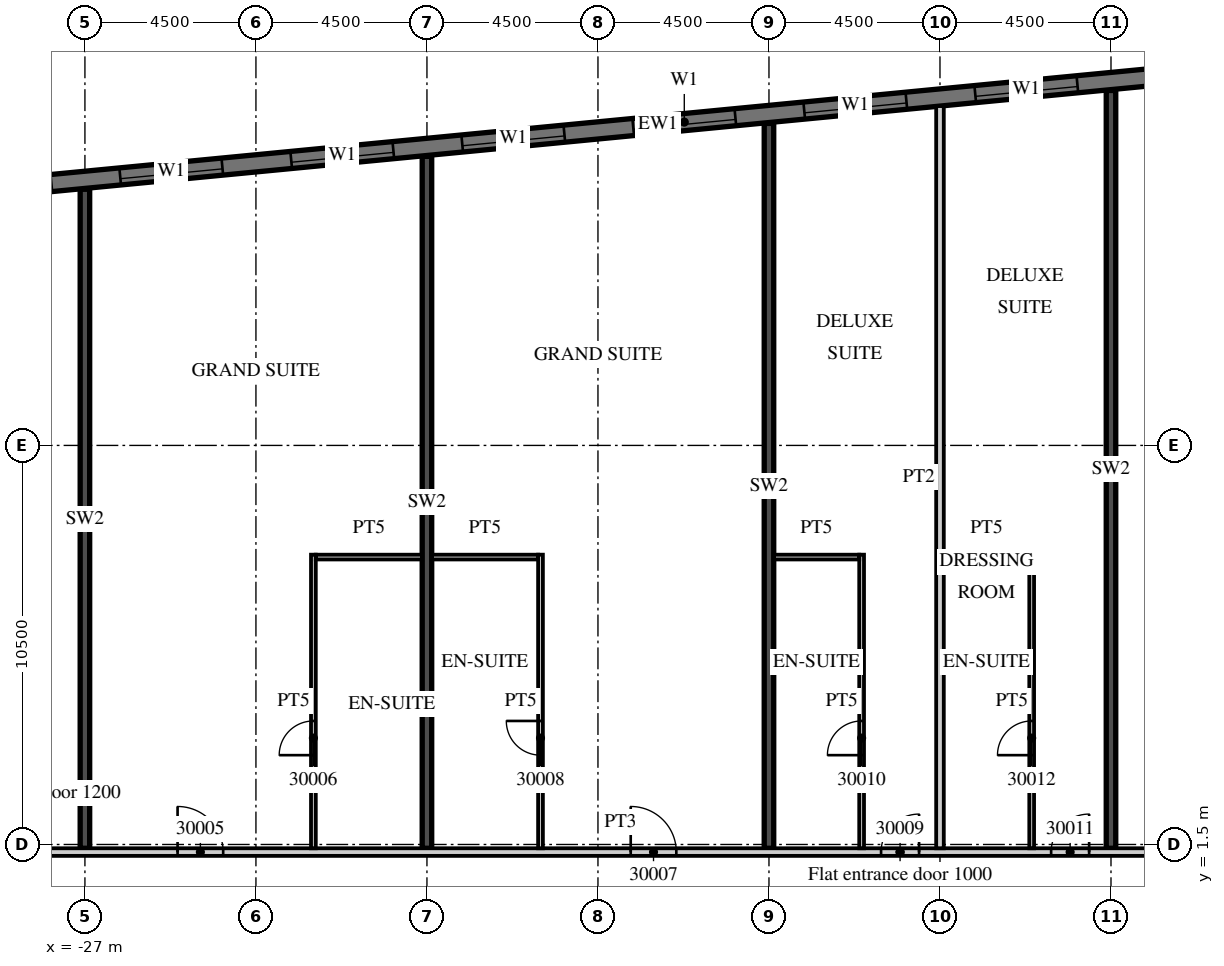
"""IFC4 building model, lengths in metres.
Left out: names, types, materials, properties, quantities, classifications, styles, units other than length and angle.
Written with IfcOpenShell. Run it as: python <this file> out.ifc"""

import sys

from ifc_helpers import new_model, si_unit, direction, frame, frame_2d, origin, place, context, subcontext, project, spatial, rectangle, extrude, element, fill, save


model = new_model("IFC4")
c1 = context("Model", 3, precision=1e-05, world=origin(), true_north=direction((0.0, 1.0)))
c2 = subcontext(c1, "Body", "Model", "MODEL_VIEW")
j1 = project(units=[si_unit("LENGTHUNIT", "METRE"), si_unit("PLANEANGLEUNIT", "RADIAN")], contexts=[c1])
p1 = place(None, origin())
s1 = spatial("IfcSite", under=j1, at=p1, CompositionType="ELEMENT")
p2 = place(p1, origin())
s2 = spatial("IfcBuilding", under=s1, at=p2, CompositionType="ELEMENT")
p3 = place(p2, frame((0.0, 0.0, 133.9)))
s3 = spatial("IfcBuildingStorey", under=s2, at=p3, CompositionType="ELEMENT", Elevation=133.9)
p4 = place(p3, frame((-27.0, 1.4, 0.0), z_axis=(0.0, 0.0, 1.0), x_axis=(0.0, 1.0, 0.0)))
e1 = element("IfcWall", 1, at=p4, inside=s3, PredefinedType="SHEAR", context=c2, shape_type="SweptSolid", body=[
    extrude(rectangle(XDim=17.34, YDim=0.25, at=frame_2d((8.67, 0.0))), origin(), (0.0, 0.0, 1.0), 3.3),
])
p5 = place(p3, frame((-18.0, 1.4, 0.0), z_axis=(0.0, 0.0, 1.0), x_axis=(0.0, 1.0, 0.0)))
e2 = element("IfcWall", 2, at=p5, inside=s3, PredefinedType="SHEAR", context=c2, shape_type="SweptSolid", body=[
    extrude(rectangle(XDim=18.207, YDim=0.25, at=frame_2d((9.104, 0.0))), origin(), (0.0, 0.0, 1.0), 3.3),
])
p6 = place(p3, frame((-9.0, 1.4, 0.0), z_axis=(0.0, 0.0, 1.0), x_axis=(0.0, 1.0, 0.0)))
e3 = element("IfcWall", 3, at=p6, inside=s3, PredefinedType="SHEAR", context=c2, shape_type="SweptSolid", body=[
    extrude(rectangle(XDim=19.073, YDim=0.25, at=frame_2d((9.537, 0.0))), origin(), (0.0, 0.0, 1.0), 3.3),
])
p7 = place(p3, frame((0.0, 1.4, 0.0), z_axis=(0.0, 0.0, 1.0), x_axis=(0.0, 1.0, 0.0)))
e4 = element("IfcWall", 4, at=p7, inside=s3, PredefinedType="SHEAR", context=c2, shape_type="SweptSolid", body=[
    extrude(rectangle(XDim=19.94, YDim=0.25, at=frame_2d((9.97, 0.0))), origin(), (0.0, 0.0, 1.0), 3.3),
])
p8 = place(p3, frame((13.521, 22.89, 0.0), z_axis=(0.0, 0.0, 1.0), x_axis=(-0.995396445054, -0.095843190545, 0.0)))
e5 = element("IfcWall", 5, at=p8, inside=s3, PredefinedType="SOLIDWALL", context=c2, shape_type="SweptSolid", body=[
    extrude(rectangle(XDim=51.114, YDim=0.45, at=frame_2d((25.557, 0.0))), origin(), (0.0, 0.0, 1.0), 3.02),
])
p9 = place(p8, frame((0.91, 0.0, 0.45)))
e6 = element("IfcOpeningElement", 6, at=p9, cuts=e5, PredefinedType="OPENING", context=c2, shape_type="SweptSolid", body=[
    extrude(rectangle(XDim=2.7, YDim=2.25, at=frame_2d((1.35, 1.125))), frame((0.0, 0.235, 0.0), z_axis=(0.0, -1.0, 0.0), x_axis=(1.0, 0.0, 0.0)), (0.0, 0.0, 1.0), 0.47),
])
p10 = place(p8, frame((5.431, 0.0, 0.45)))
e7 = element("IfcOpeningElement", 7, at=p10, cuts=e5, PredefinedType="OPENING", context=c2, shape_type="SweptSolid", body=[
    extrude(rectangle(XDim=2.7, YDim=2.25, at=frame_2d((1.35, 1.125))), frame((0.0, 0.235, 0.0), z_axis=(0.0, -1.0, 0.0), x_axis=(1.0, 0.0, 0.0)), (0.0, 0.0, 1.0), 0.47),
])
p11 = place(p8, frame((9.952, 0.0, 0.45)))
e8 = element("IfcOpeningElement", 8, at=p11, cuts=e5, PredefinedType="OPENING", context=c2, shape_type="SweptSolid", body=[
    extrude(rectangle(XDim=2.7, YDim=2.25, at=frame_2d((1.35, 1.125))), frame((0.0, 0.235, 0.0), z_axis=(0.0, -1.0, 0.0), x_axis=(1.0, 0.0, 0.0)), (0.0, 0.0, 1.0), 0.47),
])
p12 = place(p8, frame((14.473, 0.0, 0.45)))
e9 = element("IfcOpeningElement", 9, at=p12, cuts=e5, PredefinedType="OPENING", context=c2, shape_type="SweptSolid", body=[
    extrude(rectangle(XDim=2.7, YDim=2.25, at=frame_2d((1.35, 1.125))), frame((0.0, 0.235, 0.0), z_axis=(0.0, -1.0, 0.0), x_axis=(1.0, 0.0, 0.0)), (0.0, 0.0, 1.0), 0.47),
])
p13 = place(p8, frame((18.994, 0.0, 0.45)))
e10 = element("IfcOpeningElement", 10, at=p13, cuts=e5, PredefinedType="OPENING", context=c2, shape_type="SweptSolid", body=[
    extrude(rectangle(XDim=2.7, YDim=2.25, at=frame_2d((1.35, 1.125))), frame((0.0, 0.235, 0.0), z_axis=(0.0, -1.0, 0.0), x_axis=(1.0, 0.0, 0.0)), (0.0, 0.0, 1.0), 0.47),
])
p14 = place(p8, frame((23.514, 0.0, 0.45)))
e11 = element("IfcOpeningElement", 11, at=p14, cuts=e5, PredefinedType="OPENING", context=c2, shape_type="SweptSolid", body=[
    extrude(rectangle(XDim=2.7, YDim=2.25, at=frame_2d((1.35, 1.125))), frame((0.0, 0.235, 0.0), z_axis=(0.0, -1.0, 0.0), x_axis=(1.0, 0.0, 0.0)), (0.0, 0.0, 1.0), 0.47),
])
p15 = place(p8, frame((28.035, 0.0, 0.45)))
e12 = element("IfcOpeningElement", 12, at=p15, cuts=e5, PredefinedType="OPENING", context=c2, shape_type="SweptSolid", body=[
    extrude(rectangle(XDim=2.7, YDim=2.25, at=frame_2d((1.35, 1.125))), frame((0.0, 0.235, 0.0), z_axis=(0.0, -1.0, 0.0), x_axis=(1.0, 0.0, 0.0)), (0.0, 0.0, 1.0), 0.47),
])
p16 = place(p8, frame((32.556, 0.0, 0.45)))
e13 = element("IfcOpeningElement", 13, at=p16, cuts=e5, PredefinedType="OPENING", context=c2, shape_type="SweptSolid", body=[
    extrude(rectangle(XDim=2.7, YDim=2.25, at=frame_2d((1.35, 1.125))), frame((0.0, 0.235, 0.0), z_axis=(0.0, -1.0, 0.0), x_axis=(1.0, 0.0, 0.0)), (0.0, 0.0, 1.0), 0.47),
])
p17 = place(p8, frame((37.077, 0.0, 0.45)))
e14 = element("IfcOpeningElement", 14, at=p17, cuts=e5, PredefinedType="OPENING", context=c2, shape_type="SweptSolid", body=[
    extrude(rectangle(XDim=2.7, YDim=2.25, at=frame_2d((1.35, 1.125))), frame((0.0, 0.235, 0.0), z_axis=(0.0, -1.0, 0.0), x_axis=(1.0, 0.0, 0.0)), (0.0, 0.0, 1.0), 0.47),
])
p18 = place(p8, frame((41.598, 0.0, 0.45)))
e15 = element("IfcOpeningElement", 15, at=p18, cuts=e5, PredefinedType="OPENING", context=c2, shape_type="SweptSolid", body=[
    extrude(rectangle(XDim=2.7, YDim=2.25, at=frame_2d((1.35, 1.125))), frame((0.0, 0.235, 0.0), z_axis=(0.0, -1.0, 0.0), x_axis=(1.0, 0.0, 0.0)), (0.0, 0.0, 1.0), 0.47),
])
p19 = place(p8, frame((46.118, 0.0, 0.45)))
e16 = element("IfcOpeningElement", 16, at=p19, cuts=e5, PredefinedType="OPENING", context=c2, shape_type="SweptSolid", body=[
    extrude(rectangle(XDim=2.7, YDim=2.25, at=frame_2d((1.35, 1.125))), frame((0.0, 0.235, 0.0), z_axis=(0.0, -1.0, 0.0), x_axis=(1.0, 0.0, 0.0)), (0.0, 0.0, 1.0), 0.47),
])
p20 = place(p3, frame((-39.316, 1.3, 0.0), z_axis=(0.0, 0.0, 1.0), x_axis=(1.0, 0.0, 0.0)))
e17 = element("IfcWall", 17, at=p20, inside=s3, PredefinedType="PARTITIONING", context=c2, shape_type="SweptSolid", body=[
    extrude(rectangle(XDim=52.816, YDim=0.2, at=frame_2d((26.408, 0.0))), origin(), (0.0, 0.0, 1.0), 3.02),
])
p21 = place(p20, frame((0.15, 0.0, 0.0)))
e18 = element("IfcOpeningElement", 18, at=p21, cuts=e17, PredefinedType="OPENING", context=c2, shape_type="SweptSolid", body=[
    extrude(rectangle(XDim=0.9, YDim=2.1, at=frame_2d((0.45, 1.05))), frame((0.0, 0.11, 0.0), z_axis=(0.0, -1.0, 0.0), x_axis=(1.0, 0.0, 0.0)), (0.0, 0.0, 1.0), 0.22),
])
p22 = place(p20, frame((8.679, 0.0, 0.0)))
e19 = element("IfcOpeningElement", 19, at=p22, cuts=e17, PredefinedType="OPENING", context=c2, shape_type="SweptSolid", body=[
    extrude(rectangle(XDim=1.2, YDim=2.1, at=frame_2d((0.6, 1.05))), frame((0.0, 0.11, 0.0), z_axis=(0.0, -1.0, 0.0), x_axis=(1.0, 0.0, 0.0)), (0.0, 0.0, 1.0), 0.22),
])
p23 = place(p20, frame((14.754, 0.0, 0.0)))
e20 = element("IfcOpeningElement", 20, at=p23, cuts=e17, PredefinedType="OPENING", context=c2, shape_type="SweptSolid", body=[
    extrude(rectangle(XDim=1.2, YDim=2.1, at=frame_2d((0.6, 1.05))), frame((0.0, 0.11, 0.0), z_axis=(0.0, -1.0, 0.0), x_axis=(1.0, 0.0, 0.0)), (0.0, 0.0, 1.0), 0.22),
])
p24 = place(p20, frame((26.678, 0.0, 0.0)))
e21 = element("IfcOpeningElement", 21, at=p24, cuts=e17, PredefinedType="OPENING", context=c2, shape_type="SweptSolid", body=[
    extrude(rectangle(XDim=1.2, YDim=2.1, at=frame_2d((0.6, 1.05))), frame((0.0, 0.11, 0.0), z_axis=(0.0, -1.0, 0.0), x_axis=(1.0, 0.0, 0.0)), (0.0, 0.0, 1.0), 0.22),
])
p25 = place(p20, frame((33.266, 0.0, 0.0)))
e22 = element("IfcOpeningElement", 22, at=p25, cuts=e17, PredefinedType="OPENING", context=c2, shape_type="SweptSolid", body=[
    extrude(rectangle(XDim=1.0, YDim=2.1, at=frame_2d((0.5, 1.05))), frame((0.0, 0.11, 0.0), z_axis=(0.0, -1.0, 0.0), x_axis=(1.0, 0.0, 0.0)), (0.0, 0.0, 1.0), 0.22),
])
p26 = place(p20, frame((37.741, 0.0, 0.0)))
e23 = element("IfcOpeningElement", 23, at=p26, cuts=e17, PredefinedType="OPENING", context=c2, shape_type="SweptSolid", body=[
    extrude(rectangle(XDim=1.0, YDim=2.1, at=frame_2d((0.5, 1.05))), frame((0.0, 0.11, 0.0), z_axis=(0.0, -1.0, 0.0), x_axis=(1.0, 0.0, 0.0)), (0.0, 0.0, 1.0), 0.22),
])
p27 = place(p20, frame((41.754, 0.0, 0.0)))
e24 = element("IfcOpeningElement", 24, at=p27, cuts=e17, PredefinedType="OPENING", context=c2, shape_type="SweptSolid", body=[
    extrude(rectangle(XDim=1.2, YDim=2.1, at=frame_2d((0.6, 1.05))), frame((0.0, 0.11, 0.0), z_axis=(0.0, -1.0, 0.0), x_axis=(1.0, 0.0, 0.0)), (0.0, 0.0, 1.0), 0.22),
])
p28 = place(p20, frame((51.241, 0.0, 0.0)))
e25 = element("IfcOpeningElement", 25, at=p28, cuts=e17, PredefinedType="OPENING", context=c2, shape_type="SweptSolid", body=[
    extrude(rectangle(XDim=1.0, YDim=2.1, at=frame_2d((0.5, 1.05))), frame((0.0, 0.11, 0.0), z_axis=(0.0, -1.0, 0.0), x_axis=(1.0, 0.0, 0.0)), (0.0, 0.0, 1.0), 0.22),
])
p29 = place(p3, frame((-20.988, 1.4, 0.0), z_axis=(0.0, 0.0, 1.0), x_axis=(0.0, 1.0, 0.0)))
e26 = element("IfcWall", 26, at=p29, inside=s3, PredefinedType="PARTITIONING", context=c2, shape_type="SweptSolid", body=[
    extrude(rectangle(XDim=7.725, YDim=0.125, at=frame_2d((3.863, 0.0))), origin(), (0.0, 0.0, 1.0), 3.02),
])
p30 = place(p29, frame((2.45, 0.0, 0.0)))
e27 = element("IfcOpeningElement", 27, at=p30, cuts=e26, PredefinedType="OPENING", context=c2, shape_type="SweptSolid", body=[
    extrude(rectangle(XDim=0.9, YDim=2.1, at=frame_2d((0.45, 1.05))), frame((0.0, 0.073, 0.0), z_axis=(0.0, -1.0, 0.0), x_axis=(1.0, 0.0, 0.0)), (0.0, 0.0, 1.0), 0.145),
])
p31 = place(p3, frame((-20.925, 9.062, 0.0), z_axis=(0.0, 0.0, 1.0), x_axis=(1.0, 0.0, 0.0)))
e28 = element("IfcWall", 28, at=p31, inside=s3, PredefinedType="PARTITIONING", context=c2, shape_type="SweptSolid", body=[
    extrude(rectangle(XDim=2.8, YDim=0.125, at=frame_2d((1.4, 0.0))), origin(), (0.0, 0.0, 1.0), 3.02),
])
p32 = place(p3, frame((-15.012, 1.4, 0.0), z_axis=(0.0, 0.0, 1.0), x_axis=(0.0, 1.0, 0.0)))
e29 = element("IfcWall", 29, at=p32, inside=s3, PredefinedType="PARTITIONING", context=c2, shape_type="SweptSolid", body=[
    extrude(rectangle(XDim=7.725, YDim=0.125, at=frame_2d((3.863, 0.0))), origin(), (0.0, 0.0, 1.0), 3.02),
])
p33 = place(p32, frame((2.45, 0.0, 0.0)))
e30 = element("IfcOpeningElement", 30, at=p33, cuts=e29, PredefinedType="OPENING", context=c2, shape_type="SweptSolid", body=[
    extrude(rectangle(XDim=0.9, YDim=2.1, at=frame_2d((0.45, 1.05))), frame((0.0, 0.073, 0.0), z_axis=(0.0, -1.0, 0.0), x_axis=(1.0, 0.0, 0.0)), (0.0, 0.0, 1.0), 0.145),
])
p34 = place(p3, frame((-17.875, 9.062, 0.0), z_axis=(0.0, 0.0, 1.0), x_axis=(1.0, 0.0, 0.0)))
e31 = element("IfcWall", 31, at=p34, inside=s3, PredefinedType="PARTITIONING", context=c2, shape_type="SweptSolid", body=[
    extrude(rectangle(XDim=2.8, YDim=0.125, at=frame_2d((1.4, 0.0))), origin(), (0.0, 0.0, 1.0), 3.02),
])
p35 = place(p3, frame((-4.5, 1.4, 0.0), z_axis=(0.0, 0.0, 1.0), x_axis=(0.0, 1.0, 0.0)))
e32 = element("IfcWall", 32, at=p35, inside=s3, PredefinedType="PARTITIONING", context=c2, shape_type="SweptSolid", body=[
    extrude(rectangle(XDim=19.529, YDim=0.2, at=frame_2d((9.765, 0.0))), origin(), (0.0, 0.0, 1.0), 3.02),
])
p36 = place(p3, frame((-6.562, 1.4, 0.0), z_axis=(0.0, 0.0, 1.0), x_axis=(0.0, 1.0, 0.0)))
e33 = element("IfcWall", 33, at=p36, inside=s3, PredefinedType="PARTITIONING", context=c2, shape_type="SweptSolid", body=[
    extrude(rectangle(XDim=7.725, YDim=0.125, at=frame_2d((3.863, 0.0))), origin(), (0.0, 0.0, 1.0), 3.02),
])
p37 = place(p36, frame((2.45, 0.0, 0.0)))
e34 = element("IfcOpeningElement", 34, at=p37, cuts=e33, PredefinedType="OPENING", context=c2, shape_type="SweptSolid", body=[
    extrude(rectangle(XDim=0.9, YDim=2.1, at=frame_2d((0.45, 1.05))), frame((0.0, 0.073, 0.0), z_axis=(0.0, -1.0, 0.0), x_axis=(1.0, 0.0, 0.0)), (0.0, 0.0, 1.0), 0.145),
])
p38 = place(p3, frame((-8.875, 9.062, 0.0), z_axis=(0.0, 0.0, 1.0), x_axis=(1.0, 0.0, 0.0)))
e35 = element("IfcWall", 35, at=p38, inside=s3, PredefinedType="PARTITIONING", context=c2, shape_type="SweptSolid", body=[
    extrude(rectangle(XDim=2.25, YDim=0.125, at=frame_2d((1.125, 0.0))), origin(), (0.0, 0.0, 1.0), 3.02),
])
p39 = place(p3, frame((-2.087, 1.4, 0.0), z_axis=(0.0, 0.0, 1.0), x_axis=(0.0, 1.0, 0.0)))
e36 = element("IfcWall", 36, at=p39, inside=s3, PredefinedType="PARTITIONING", context=c2, shape_type="SweptSolid", body=[
    extrude(rectangle(XDim=7.725, YDim=0.125, at=frame_2d((3.863, 0.0))), origin(), (0.0, 0.0, 1.0), 3.02),
])
p40 = place(p39, frame((2.45, 0.0, 0.0)))
e37 = element("IfcOpeningElement", 37, at=p40, cuts=e36, PredefinedType="OPENING", context=c2, shape_type="SweptSolid", body=[
    extrude(rectangle(XDim=0.9, YDim=2.1, at=frame_2d((0.45, 1.05))), frame((0.0, 0.073, 0.0), z_axis=(0.0, -1.0, 0.0), x_axis=(1.0, 0.0, 0.0)), (0.0, 0.0, 1.0), 0.145),
])
p41 = place(p3, frame((-4.4, 9.062, 0.0), z_axis=(0.0, 0.0, 1.0), x_axis=(1.0, 0.0, 0.0)))
e38 = element("IfcWall", 38, at=p41, inside=s3, PredefinedType="PARTITIONING", context=c2, shape_type="SweptSolid", body=[
    extrude(rectangle(XDim=2.25, YDim=0.125, at=frame_2d((1.125, 0.0))), origin(), (0.0, 0.0, 1.0), 3.02),
])
p42 = place(p12, origin())
e39 = element("IfcWindow", 39, at=p42, inside=s3, PartitioningType="SINGLE_PANEL", PredefinedType="WINDOW", context=c2, shape_type="SweptSolid", body=[
    extrude(rectangle(XDim=2.7, YDim=2.25, at=frame_2d((1.35, 1.125))), frame((0.0, 0.09, 0.0), z_axis=(0.0, -1.0, 0.0), x_axis=(1.0, 0.0, 0.0)), (0.0, 0.0, 1.0), 0.06),
])
fill(e9, e39)
p43 = place(p13, origin())
e40 = element("IfcWindow", 40, at=p43, inside=s3, PartitioningType="SINGLE_PANEL", PredefinedType="WINDOW", context=c2, shape_type="SweptSolid", body=[
    extrude(rectangle(XDim=2.7, YDim=2.25, at=frame_2d((1.35, 1.125))), frame((0.0, 0.09, 0.0), z_axis=(0.0, -1.0, 0.0), x_axis=(1.0, 0.0, 0.0)), (0.0, 0.0, 1.0), 0.06),
])
fill(e10, e40)
p44 = place(p14, origin())
e41 = element("IfcWindow", 41, at=p44, inside=s3, PartitioningType="SINGLE_PANEL", PredefinedType="WINDOW", context=c2, shape_type="SweptSolid", body=[
    extrude(rectangle(XDim=2.7, YDim=2.25, at=frame_2d((1.35, 1.125))), frame((0.0, 0.09, 0.0), z_axis=(0.0, -1.0, 0.0), x_axis=(1.0, 0.0, 0.0)), (0.0, 0.0, 1.0), 0.06),
])
fill(e11, e41)
p45 = place(p15, origin())
e42 = element("IfcWindow", 42, at=p45, inside=s3, PartitioningType="SINGLE_PANEL", PredefinedType="WINDOW", context=c2, shape_type="SweptSolid", body=[
    extrude(rectangle(XDim=2.7, YDim=2.25, at=frame_2d((1.35, 1.125))), frame((0.0, 0.09, 0.0), z_axis=(0.0, -1.0, 0.0), x_axis=(1.0, 0.0, 0.0)), (0.0, 0.0, 1.0), 0.06),
])
fill(e12, e42)
p46 = place(p16, origin())
e43 = element("IfcWindow", 43, at=p46, inside=s3, PartitioningType="SINGLE_PANEL", PredefinedType="WINDOW", context=c2, shape_type="SweptSolid", body=[
    extrude(rectangle(XDim=2.7, YDim=2.25, at=frame_2d((1.35, 1.125))), frame((0.0, 0.09, 0.0), z_axis=(0.0, -1.0, 0.0), x_axis=(1.0, 0.0, 0.0)), (0.0, 0.0, 1.0), 0.06),
])
fill(e13, e43)
p47 = place(p17, origin())
e44 = element("IfcWindow", 44, at=p47, inside=s3, PartitioningType="SINGLE_PANEL", PredefinedType="WINDOW", context=c2, shape_type="SweptSolid", body=[
    extrude(rectangle(XDim=2.7, YDim=2.25, at=frame_2d((1.35, 1.125))), frame((0.0, 0.09, 0.0), z_axis=(0.0, -1.0, 0.0), x_axis=(1.0, 0.0, 0.0)), (0.0, 0.0, 1.0), 0.06),
])
fill(e14, e44)
p48 = place(p23, origin())
e45 = element("IfcDoor", 45, at=p48, inside=s3, OperationType="SINGLE_SWING_LEFT", PredefinedType="DOOR", context=c2, shape_type="SweptSolid", body=[
    extrude(rectangle(XDim=1.2, YDim=2.1, at=frame_2d((0.6, 1.05))), frame((0.0, 0.025, 0.0), z_axis=(0.0, -1.0, 0.0), x_axis=(1.0, 0.0, 0.0)), (0.0, 0.0, 1.0), 0.05),
])
fill(e20, e45)
p49 = place(p30, origin())
e46 = element("IfcDoor", 46, at=p49, inside=s3, OperationType="SINGLE_SWING_LEFT", PredefinedType="DOOR", context=c2, shape_type="SweptSolid", body=[
    extrude(rectangle(XDim=0.9, YDim=2.1, at=frame_2d((0.45, 1.05))), frame((0.0, 0.025, 0.0), z_axis=(0.0, -1.0, 0.0), x_axis=(1.0, 0.0, 0.0)), (0.0, 0.0, 1.0), 0.05),
])
fill(e27, e46)
p50 = place(p24, origin())
e47 = element("IfcDoor", 47, at=p50, inside=s3, OperationType="SINGLE_SWING_LEFT", PredefinedType="DOOR", context=c2, shape_type="SweptSolid", body=[
    extrude(rectangle(XDim=1.2, YDim=2.1, at=frame_2d((0.6, 1.05))), frame((0.0, 0.025, 0.0), z_axis=(0.0, -1.0, 0.0), x_axis=(1.0, 0.0, 0.0)), (0.0, 0.0, 1.0), 0.05),
])
fill(e21, e47)
p51 = place(p33, origin())
e48 = element("IfcDoor", 48, at=p51, inside=s3, OperationType="SINGLE_SWING_RIGHT", PredefinedType="DOOR", context=c2, shape_type="SweptSolid", body=[
    extrude(rectangle(XDim=0.9, YDim=2.1, at=frame_2d((0.45, 1.05))), frame((0.0, 0.025, 0.0), z_axis=(0.0, -1.0, 0.0), x_axis=(1.0, 0.0, 0.0)), (0.0, 0.0, 1.0), 0.05),
])
fill(e30, e48)
p52 = place(p25, origin())
e49 = element("IfcDoor", 49, at=p52, inside=s3, OperationType="SINGLE_SWING_RIGHT", PredefinedType="DOOR", context=c2, shape_type="SweptSolid", body=[
    extrude(rectangle(XDim=1.0, YDim=2.1, at=frame_2d((0.5, 1.05))), frame((0.0, 0.025, 0.0), z_axis=(0.0, -1.0, 0.0), x_axis=(1.0, 0.0, 0.0)), (0.0, 0.0, 1.0), 0.05),
])
fill(e22, e49)
p53 = place(p37, origin())
e50 = element("IfcDoor", 50, at=p53, inside=s3, OperationType="SINGLE_SWING_LEFT", PredefinedType="DOOR", context=c2, shape_type="SweptSolid", body=[
    extrude(rectangle(XDim=0.9, YDim=2.1, at=frame_2d((0.45, 1.05))), frame((0.0, 0.025, 0.0), z_axis=(0.0, -1.0, 0.0), x_axis=(1.0, 0.0, 0.0)), (0.0, 0.0, 1.0), 0.05),
])
fill(e34, e50)
p54 = place(p26, origin())
e51 = element("IfcDoor", 51, at=p54, inside=s3, OperationType="SINGLE_SWING_RIGHT", PredefinedType="DOOR", context=c2, shape_type="SweptSolid", body=[
    extrude(rectangle(XDim=1.0, YDim=2.1, at=frame_2d((0.5, 1.05))), frame((0.0, 0.025, 0.0), z_axis=(0.0, -1.0, 0.0), x_axis=(1.0, 0.0, 0.0)), (0.0, 0.0, 1.0), 0.05),
])
fill(e23, e51)
p55 = place(p40, origin())
e52 = element("IfcDoor", 52, at=p55, inside=s3, OperationType="SINGLE_SWING_LEFT", PredefinedType="DOOR", context=c2, shape_type="SweptSolid", body=[
    extrude(rectangle(XDim=0.9, YDim=2.1, at=frame_2d((0.45, 1.05))), frame((0.0, 0.025, 0.0), z_axis=(0.0, -1.0, 0.0), x_axis=(1.0, 0.0, 0.0)), (0.0, 0.0, 1.0), 0.05),
])
fill(e37, e52)
save(model, sys.argv[1])
